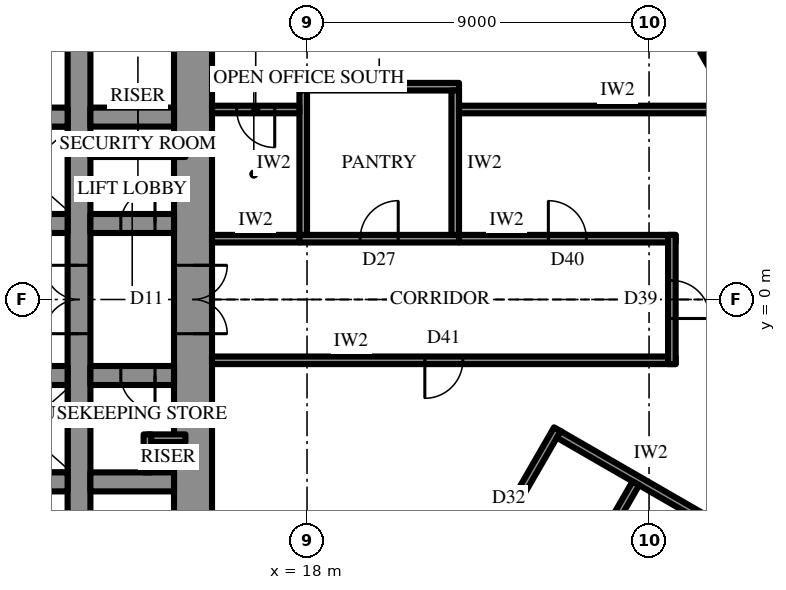
"""IFC4 building model, lengths in metres.
Left out: names, types, materials, properties, quantities, classifications, styles, units other than length and angle.
Written with IfcOpenShell. Run it as: python <this file> out.ifc"""

import sys

from ifc_helpers import new_model, si_unit, direction, frame, frame_2d, origin, origin_2d, place, context, subcontext, project, spatial, rectangle, extrude, element, fill, save


model = new_model("IFC4")
c1 = context("Model", 3, precision=1e-05, world=origin(), true_north=direction((0.0, 1.0)))
c2 = subcontext(c1, "Body", "Model", "MODEL_VIEW")
j1 = project(units=[si_unit("LENGTHUNIT", "METRE"), si_unit("PLANEANGLEUNIT", "RADIAN")], contexts=[c1])
p1 = place(None, origin())
s1 = spatial("IfcSite", under=j1, at=p1, CompositionType="ELEMENT")
p2 = place(p1, origin())
s2 = spatial("IfcBuilding", under=s1, at=p2, CompositionType="ELEMENT")
p3 = place(p2, frame((0.0, 0.0, 244.9)))
s3 = spatial("IfcBuildingStorey", under=s2, at=p3, CompositionType="ELEMENT", Elevation=244.9)
for number, where, z_axis, x_axis in (
    (1, (29.171, 6.175, 0.0), (0.0, 0.0, 1.0), (-0.5, 0.866, 0.0)),
    (2, (29.171, -6.175, 0.0), (0.0, 0.0, 1.0), (0.5, 0.866, 0.0)),
):
    element("IfcColumn", number, at=place(p3, frame(where, z_axis=z_axis, x_axis=x_axis)), inside=s3, PredefinedType="COLUMN", context=c2, shape_type="SweptSolid", body=[
        extrude(rectangle(XDim=1.3, YDim=1.1, at=origin_2d()), origin(), (0.0, 0.0, 1.0), 4.2),
    ])
p4 = place(p3, frame((15.0, -10.7, 0.0), z_axis=(0.0, 0.0, 1.0), x_axis=(0.0, 1.0, 0.0)))
e3 = element("IfcWall", 3, at=p4, inside=s3, PredefinedType="SHEAR", context=c2, shape_type="SweptSolid", body=[
    extrude(rectangle(XDim=21.4, YDim=1.0, at=frame_2d((10.7, 0.0))), origin(), (0.0, 0.0, 1.0), 4.2),
])
p5 = place(p4, frame((9.8, 0.0, 0.0)))
e4 = element("IfcOpeningElement", 4, at=p5, cuts=e3, PredefinedType="OPENING", context=c2, shape_type="SweptSolid", body=[
    extrude(rectangle(XDim=1.8, YDim=2.4, at=frame_2d((0.9, 1.2))), frame((0.0, 0.51, 0.0), z_axis=(0.0, -1.0, 0.0), x_axis=(1.0, 0.0, 0.0)), (0.0, 0.0, 1.0), 1.02),
])
p6 = place(p3, frame((12.0, -10.7, 0.0), z_axis=(0.0, 0.0, 1.0), x_axis=(0.0, 1.0, 0.0)))
e5 = element("IfcWall", 5, at=p6, inside=s3, PredefinedType="SHEAR", context=c2, shape_type="SweptSolid", body=[
    extrude(rectangle(XDim=21.4, YDim=0.6, at=frame_2d((10.7, 0.0))), origin(), (0.0, 0.0, 1.0), 4.2),
])
p7 = place(p6, frame((9.8, 0.0, 0.0)))
e6 = element("IfcOpeningElement", 6, at=p7, cuts=e5, PredefinedType="OPENING", context=c2, shape_type="SweptSolid", body=[
    extrude(rectangle(XDim=1.8, YDim=2.4, at=frame_2d((0.9, 1.2))), frame((0.0, 0.31, 0.0), z_axis=(0.0, -1.0, 0.0), x_axis=(1.0, 0.0, 0.0)), (0.0, 0.0, 1.0), 0.62),
])
p8 = place(p3, frame((-3.2, 2.0, 0.0), z_axis=(0.0, 0.0, 1.0), x_axis=(1.0, 0.0, 0.0)))
e7 = element("IfcWall", 7, at=p8, inside=s3, PredefinedType="SHEAR", context=c2, shape_type="SweptSolid", body=[
    extrude(rectangle(XDim=14.9, YDim=0.5, at=frame_2d((7.45, 0.0))), origin(), (0.0, 0.0, 1.0), 4.2),
])
p9 = place(p8, frame((1.15, 0.0, 0.0)))
e8 = element("IfcOpeningElement", 8, at=p9, cuts=e7, PredefinedType="OPENING", context=c2, shape_type="SweptSolid", body=[
    extrude(rectangle(XDim=1.1, YDim=2.2, at=frame_2d((0.55, 1.1))), frame((0.0, 0.26, 0.0), z_axis=(0.0, -1.0, 0.0), x_axis=(1.0, 0.0, 0.0)), (0.0, 0.0, 1.0), 0.52),
])
p10 = place(p8, frame((4.15, 0.0, 0.0)))
e9 = element("IfcOpeningElement", 9, at=p10, cuts=e7, PredefinedType="OPENING", context=c2, shape_type="SweptSolid", body=[
    extrude(rectangle(XDim=1.1, YDim=2.2, at=frame_2d((0.55, 1.1))), frame((0.0, 0.26, 0.0), z_axis=(0.0, -1.0, 0.0), x_axis=(1.0, 0.0, 0.0)), (0.0, 0.0, 1.0), 0.52),
])
p11 = place(p8, frame((7.15, 0.0, 0.0)))
e10 = element("IfcOpeningElement", 10, at=p11, cuts=e7, PredefinedType="OPENING", context=c2, shape_type="SweptSolid", body=[
    extrude(rectangle(XDim=1.1, YDim=2.2, at=frame_2d((0.55, 1.1))), frame((0.0, 0.26, 0.0), z_axis=(0.0, -1.0, 0.0), x_axis=(1.0, 0.0, 0.0)), (0.0, 0.0, 1.0), 0.52),
])
p12 = place(p8, frame((10.15, 0.0, 0.0)))
e11 = element("IfcOpeningElement", 11, at=p12, cuts=e7, PredefinedType="OPENING", context=c2, shape_type="SweptSolid", body=[
    extrude(rectangle(XDim=1.1, YDim=2.2, at=frame_2d((0.55, 1.1))), frame((0.0, 0.26, 0.0), z_axis=(0.0, -1.0, 0.0), x_axis=(1.0, 0.0, 0.0)), (0.0, 0.0, 1.0), 0.52),
])
p13 = place(p3, frame((12.3, 2.0, 0.0), z_axis=(0.0, 0.0, 1.0), x_axis=(1.0, 0.0, 0.0)))
e12 = element("IfcWall", 12, at=p13, inside=s3, PredefinedType="SHEAR", context=c2, shape_type="SweptSolid", body=[
    extrude(rectangle(XDim=2.2, YDim=0.5, at=frame_2d((1.1, 0.0))), origin(), (0.0, 0.0, 1.0), 4.2),
])
p14 = place(p13, frame((0.8, 0.0, 0.0)))
e13 = element("IfcOpeningElement", 13, at=p14, cuts=e12, PredefinedType="OPENING", context=c2, shape_type="SweptSolid", body=[
    extrude(rectangle(XDim=0.9, YDim=2.2, at=frame_2d((0.45, 1.1))), frame((0.0, 0.26, 0.0), z_axis=(0.0, -1.0, 0.0), x_axis=(1.0, 0.0, 0.0)), (0.0, 0.0, 1.0), 0.52),
])
p15 = place(p3, frame((-11.7, 4.8, 0.0), z_axis=(0.0, 0.0, 1.0), x_axis=(1.0, 0.0, 0.0)))
e14 = element("IfcWall", 14, at=p15, inside=s3, PredefinedType="SHEAR", context=c2, shape_type="SweptSolid", body=[
    extrude(rectangle(XDim=23.4, YDim=0.5, at=frame_2d((11.7, 0.0))), origin(), (0.0, 0.0, 1.0), 4.2),
])
p16 = place(p15, frame((6.6, 0.0, 0.0)))
e15 = element("IfcOpeningElement", 15, at=p16, cuts=e14, PredefinedType="OPENING", context=c2, shape_type="SweptSolid", body=[
    extrude(rectangle(XDim=1.2, YDim=2.2, at=frame_2d((0.6, 1.1))), frame((0.0, 0.26, 0.0), z_axis=(0.0, -1.0, 0.0), x_axis=(1.0, 0.0, 0.0)), (0.0, 0.0, 1.0), 0.52),
])
p17 = place(p15, frame((3.6, 0.0, 0.0)))
e16 = element("IfcOpeningElement", 16, at=p17, cuts=e14, PredefinedType="OPENING", context=c2, shape_type="SweptSolid", body=[
    extrude(rectangle(XDim=1.2, YDim=2.2, at=frame_2d((0.6, 1.1))), frame((0.0, 0.26, 0.0), z_axis=(0.0, -1.0, 0.0), x_axis=(1.0, 0.0, 0.0)), (0.0, 0.0, 1.0), 0.52),
])
p18 = place(p3, frame((12.3, 4.8, 0.0), z_axis=(0.0, 0.0, 1.0), x_axis=(1.0, 0.0, 0.0)))
e17 = element("IfcWall", 17, at=p18, inside=s3, PredefinedType="SHEAR", context=c2, shape_type="SweptSolid", body=[
    extrude(rectangle(XDim=2.2, YDim=0.5, at=frame_2d((1.1, 0.0))), origin(), (0.0, 0.0, 1.0), 4.2),
])
p19 = place(p3, frame((14.5, -2.0, 0.0), z_axis=(0.0, 0.0, 1.0), x_axis=(-1.0, 0.0, 0.0)))
e18 = element("IfcWall", 18, at=p19, inside=s3, PredefinedType="SHEAR", context=c2, shape_type="SweptSolid", body=[
    extrude(rectangle(XDim=2.2, YDim=0.5, at=frame_2d((1.1, 0.0))), origin(), (0.0, 0.0, 1.0), 4.2),
])
p20 = place(p19, frame((0.5, 0.0, 0.0)))
e19 = element("IfcOpeningElement", 19, at=p20, cuts=e18, PredefinedType="OPENING", context=c2, shape_type="SweptSolid", body=[
    extrude(rectangle(XDim=0.9, YDim=2.2, at=frame_2d((0.45, 1.1))), frame((0.0, 0.26, 0.0), z_axis=(0.0, -1.0, 0.0), x_axis=(1.0, 0.0, 0.0)), (0.0, 0.0, 1.0), 0.52),
])
p21 = place(p3, frame((11.7, -2.0, 0.0), z_axis=(0.0, 0.0, 1.0), x_axis=(-1.0, 0.0, 0.0)))
e20 = element("IfcWall", 20, at=p21, inside=s3, PredefinedType="SHEAR", context=c2, shape_type="SweptSolid", body=[
    extrude(rectangle(XDim=5.9, YDim=0.5, at=frame_2d((2.95, 0.0))), origin(), (0.0, 0.0, 1.0), 4.2),
])
p22 = place(p3, frame((14.5, -4.8, 0.0), z_axis=(0.0, 0.0, 1.0), x_axis=(-1.0, 0.0, 0.0)))
e21 = element("IfcWall", 21, at=p22, inside=s3, PredefinedType="SHEAR", context=c2, shape_type="SweptSolid", body=[
    extrude(rectangle(XDim=2.2, YDim=0.5, at=frame_2d((1.1, 0.0))), origin(), (0.0, 0.0, 1.0), 4.2),
])
p23 = place(p3, frame((11.7, -4.8, 0.0), z_axis=(0.0, 0.0, 1.0), x_axis=(-1.0, 0.0, 0.0)))
e22 = element("IfcWall", 22, at=p23, inside=s3, PredefinedType="SHEAR", context=c2, shape_type="SweptSolid", body=[
    extrude(rectangle(XDim=23.4, YDim=0.5, at=frame_2d((11.7, 0.0))), origin(), (0.0, 0.0, 1.0), 4.2),
])
p24 = place(p23, frame((6.6, 0.0, 0.0)))
e23 = element("IfcOpeningElement", 23, at=p24, cuts=e22, PredefinedType="OPENING", context=c2, shape_type="SweptSolid", body=[
    extrude(rectangle(XDim=1.2, YDim=2.2, at=frame_2d((0.6, 1.1))), frame((0.0, 0.26, 0.0), z_axis=(0.0, -1.0, 0.0), x_axis=(1.0, 0.0, 0.0)), (0.0, 0.0, 1.0), 0.52),
])
p25 = place(p23, frame((3.6, 0.0, 0.0)))
e24 = element("IfcOpeningElement", 24, at=p25, cuts=e22, PredefinedType="OPENING", context=c2, shape_type="SweptSolid", body=[
    extrude(rectangle(XDim=1.2, YDim=2.2, at=frame_2d((0.6, 1.1))), frame((0.0, 0.26, 0.0), z_axis=(0.0, -1.0, 0.0), x_axis=(1.0, 0.0, 0.0)), (0.0, 0.0, 1.0), 0.52),
])
p26 = place(p3, frame((18.707, -25.299, 0.0), z_axis=(0.0, 0.0, 1.0), x_axis=(0.500000442367, 0.866025148383, 0.0)))
e25 = element("IfcWall", 25, at=p26, inside=s3, PredefinedType="SOLIDWALL", context=c2, shape_type="SweptSolid", body=[
    extrude(rectangle(XDim=25.113, YDim=0.3, at=frame_2d((12.556, 0.0))), origin(), (0.0, 0.0, 1.0), 2.8),
])
p27 = place(p26, frame((4.278, 0.0, 0.6)))
e26 = element("IfcOpeningElement", 26, at=p27, cuts=e25, PredefinedType="OPENING", context=c2, shape_type="SweptSolid", body=[
    extrude(rectangle(XDim=2.7, YDim=1.95, at=frame_2d((1.35, 0.975))), frame((0.0, 0.16, 0.0), z_axis=(0.0, -1.0, 0.0), x_axis=(1.0, 0.0, 0.0)), (0.0, 0.0, 1.0), 0.32),
])
p28 = place(p26, frame((9.647, 0.0, 0.0)))
e27 = element("IfcOpeningElement", 27, at=p28, cuts=e25, PredefinedType="OPENING", context=c2, shape_type="SweptSolid", body=[
    extrude(rectangle(XDim=1.2, YDim=2.4, at=frame_2d((0.6, 1.2))), frame((0.0, 0.16, 0.0), z_axis=(0.0, -1.0, 0.0), x_axis=(1.0, 0.0, 0.0)), (0.0, 0.0, 1.0), 0.32),
])
p29 = place(p26, frame((13.516, 0.0, 0.6)))
e28 = element("IfcOpeningElement", 28, at=p29, cuts=e25, PredefinedType="OPENING", context=c2, shape_type="SweptSolid", body=[
    extrude(rectangle(XDim=2.7, YDim=1.95, at=frame_2d((1.35, 0.975))), frame((0.0, 0.16, 0.0), z_axis=(0.0, -1.0, 0.0), x_axis=(1.0, 0.0, 0.0)), (0.0, 0.0, 1.0), 0.32),
])
p30 = place(p26, frame((18.135, 0.0, 0.6)))
e29 = element("IfcOpeningElement", 29, at=p30, cuts=e25, PredefinedType="OPENING", context=c2, shape_type="SweptSolid", body=[
    extrude(rectangle(XDim=2.7, YDim=1.95, at=frame_2d((1.35, 0.975))), frame((0.0, 0.16, 0.0), z_axis=(0.0, -1.0, 0.0), x_axis=(1.0, 0.0, 0.0)), (0.0, 0.0, 1.0), 0.32),
])
p31 = place(p3, frame((12.3, 3.85, 0.0), z_axis=(0.0, 0.0, 1.0), x_axis=(1.0, 0.0, 0.0)))
e30 = element("IfcWall", 30, at=p31, inside=s3, PredefinedType="PARTITIONING", context=c2, shape_type="SweptSolid", body=[
    extrude(rectangle(XDim=2.5, YDim=0.2, at=frame_2d((1.25, 0.0))), origin(), (0.0, 0.0, 1.0), 4.0),
])
for number, where, z_axis, x_axis in (
    (31, (14.8, -3.65, 0.0), (0.0, 0.0, 1.0), (-1.0, 0.0, 0.0)),
    (32, (13.8, -3.55, 0.0), (0.0, 0.0, 1.0), (0.0, -1.0, 0.0)),
):
    element("IfcWall", number, at=place(p3, frame(where, z_axis=z_axis, x_axis=x_axis)), inside=s3, PredefinedType="PARTITIONING", context=c2, shape_type="SweptSolid", body=[
        extrude(rectangle(XDim=1.0, YDim=0.2, at=frame_2d((0.5, 0.0))), origin(), (0.0, 0.0, 1.0), 4.0),
    ])
p32 = place(p3, frame((17.559, -15.587, 0.0), z_axis=(0.0, 0.0, 1.0), x_axis=(0.500002095642, 0.866024193862, 0.0)))
e33 = element("IfcWall", 33, at=p32, inside=s3, PredefinedType="PARTITIONING", context=c2, shape_type="SweptSolid", body=[
    extrude(rectangle(XDim=14.057, YDim=0.2, at=frame_2d((7.028, 0.0))), origin(), (0.0, 0.0, 1.0), 4.0),
])
p33 = place(p32, frame((6.528, 0.0, 0.0)))
e34 = element("IfcOpeningElement", 34, at=p33, cuts=e33, PredefinedType="OPENING", context=c2, shape_type="SweptSolid", body=[
    extrude(rectangle(XDim=1.0, YDim=2.2, at=frame_2d((0.5, 1.1))), frame((0.0, 0.11, 0.0), z_axis=(0.0, -1.0, 0.0), x_axis=(1.0, 0.0, 0.0)), (0.0, 0.0, 1.0), 0.22),
])
p34 = place(p3, frame((24.624, -3.55, 0.0), z_axis=(0.0, 0.0, 1.0), x_axis=(0.866038532462, -0.499977259774, 0.0)))
e35 = element("IfcWall", 35, at=p34, inside=s3, PredefinedType="PARTITIONING", context=c2, shape_type="SweptSolid", body=[
    extrude(rectangle(XDim=4.7, YDim=0.2, at=frame_2d((2.35, 0.0))), origin(), (0.0, 0.0, 1.0), 3.082),
])
p35 = place(p3, frame((24.443, -8.663, 0.0), z_axis=(0.0, 0.0, 1.0), x_axis=(0.499983916363, 0.866034689477, 0.0)))
e36 = element("IfcWall", 36, at=p35, inside=s3, PredefinedType="PARTITIONING", context=c2, shape_type="SweptSolid", body=[
    extrude(rectangle(XDim=4.419, YDim=0.2, at=frame_2d((2.209, 0.0))), origin(), (0.0, 0.0, 1.0), 4.0),
])
p36 = place(p3, frame((17.8, 1.6, 0.0), z_axis=(0.0, 0.0, 1.0), x_axis=(1.0, 0.0, 0.0)))
e37 = element("IfcWall", 37, at=p36, inside=s3, PredefinedType="PARTITIONING", context=c2, shape_type="SweptSolid", body=[
    extrude(rectangle(XDim=4.2, YDim=0.2, at=frame_2d((2.1, 0.0))), origin(), (0.0, 0.0, 1.0), 4.0),
])
p37 = place(p36, frame((1.6, 0.0, 0.0)))
e38 = element("IfcOpeningElement", 38, at=p37, cuts=e37, PredefinedType="OPENING", context=c2, shape_type="SweptSolid", body=[
    extrude(rectangle(XDim=1.0, YDim=2.2, at=frame_2d((0.5, 1.1))), frame((0.0, 0.11, 0.0), z_axis=(0.0, -1.0, 0.0), x_axis=(1.0, 0.0, 0.0)), (0.0, 0.0, 1.0), 0.22),
])
p38 = place(p3, frame((17.8, 5.6, 0.0), z_axis=(0.0, 0.0, 1.0), x_axis=(1.0, 0.0, 0.0)))
e39 = element("IfcWall", 39, at=p38, inside=s3, PredefinedType="PARTITIONING", context=c2, shape_type="SweptSolid", body=[
    extrude(rectangle(XDim=4.2, YDim=0.2, at=frame_2d((2.1, 0.0))), origin(), (0.0, 0.0, 1.0), 4.0),
])
for number, where, z_axis, x_axis in (
    (40, (17.9, 1.7, 0.0), (0.0, 0.0, 1.0), (0.0, 1.0, 0.0)),
    (41, (21.9, 1.7, 0.0), (0.0, 0.0, 1.0), (0.0, 1.0, 0.0)),
):
    element("IfcWall", number, at=place(p3, frame(where, z_axis=z_axis, x_axis=x_axis)), inside=s3, PredefinedType="PARTITIONING", context=c2, shape_type="SweptSolid", body=[
        extrude(rectangle(XDim=3.8, YDim=0.2, at=frame_2d((1.9, 0.0))), origin(), (0.0, 0.0, 1.0), 4.0),
    ])
p39 = place(p3, frame((15.5, 1.6, 0.0), z_axis=(0.0, 0.0, 1.0), x_axis=(1.0, 0.0, 0.0)))
e42 = element("IfcWall", 42, at=p39, inside=s3, PredefinedType="PARTITIONING", context=c2, shape_type="SweptSolid", body=[
    extrude(rectangle(XDim=2.3, YDim=0.2, at=frame_2d((1.15, 0.0))), origin(), (0.0, 0.0, 1.0), 4.0),
])
p40 = place(p3, frame((22.0, 1.6, 0.0), z_axis=(0.0, 0.0, 1.0), x_axis=(1.0, 0.0, 0.0)))
e43 = element("IfcWall", 43, at=p40, inside=s3, PredefinedType="PARTITIONING", context=c2, shape_type="SweptSolid", body=[
    extrude(rectangle(XDim=5.7, YDim=0.2, at=frame_2d((2.85, 0.0))), origin(), (0.0, 0.0, 1.0), 4.0),
])
p41 = place(p40, frame((2.35, 0.0, 0.0)))
e44 = element("IfcOpeningElement", 44, at=p41, cuts=e43, PredefinedType="OPENING", context=c2, shape_type="SweptSolid", body=[
    extrude(rectangle(XDim=1.0, YDim=2.2, at=frame_2d((0.5, 1.1))), frame((0.0, 0.11, 0.0), z_axis=(0.0, -1.0, 0.0), x_axis=(1.0, 0.0, 0.0)), (0.0, 0.0, 1.0), 0.22),
])
p42 = place(p3, frame((15.5, -1.6, 0.0), z_axis=(0.0, 0.0, 1.0), x_axis=(1.0, 0.0, 0.0)))
e45 = element("IfcWall", 45, at=p42, inside=s3, PredefinedType="PARTITIONING", context=c2, shape_type="SweptSolid", body=[
    extrude(rectangle(XDim=12.2, YDim=0.2, at=frame_2d((6.1, 0.0))), origin(), (0.0, 0.0, 1.0), 4.0),
])
p43 = place(p42, frame((5.6, 0.0, 0.0)))
e46 = element("IfcOpeningElement", 46, at=p43, cuts=e45, PredefinedType="OPENING", context=c2, shape_type="SweptSolid", body=[
    extrude(rectangle(XDim=1.0, YDim=2.2, at=frame_2d((0.5, 1.1))), frame((0.0, 0.11, 0.0), z_axis=(0.0, -1.0, 0.0), x_axis=(1.0, 0.0, 0.0)), (0.0, 0.0, 1.0), 0.22),
])
p44 = place(p3, frame((27.6, -1.7, 0.0), z_axis=(0.0, 0.0, 1.0), x_axis=(0.0, 1.0, 0.0)))
e47 = element("IfcWall", 47, at=p44, inside=s3, PredefinedType="PARTITIONING", context=c2, shape_type="SweptSolid", body=[
    extrude(rectangle(XDim=3.4, YDim=0.2, at=frame_2d((1.7, 0.0))), origin(), (0.0, 0.0, 1.0), 4.0),
])
p45 = place(p44, frame((1.2, 0.0, 0.0)))
e48 = element("IfcOpeningElement", 48, at=p45, cuts=e47, PredefinedType="OPENING", context=c2, shape_type="SweptSolid", body=[
    extrude(rectangle(XDim=1.0, YDim=2.2, at=frame_2d((0.5, 1.1))), frame((0.0, 0.11, 0.0), z_axis=(0.0, -1.0, 0.0), x_axis=(1.0, 0.0, 0.0)), (0.0, 0.0, 1.0), 0.22),
])
p46 = place(p3, frame((15.5, 5.0, 0.0), z_axis=(0.0, 0.0, 1.0), x_axis=(1.0, 0.0, 0.0)))
e49 = element("IfcWall", 49, at=p46, inside=s3, PredefinedType="PARTITIONING", context=c2, shape_type="SweptSolid", body=[
    extrude(rectangle(XDim=2.3, YDim=0.2, at=frame_2d((1.15, 0.0))), origin(), (0.0, 0.0, 1.0), 4.0),
])
p47 = place(p46, frame((0.65, 0.0, 0.0)))
e50 = element("IfcOpeningElement", 50, at=p47, cuts=e49, PredefinedType="OPENING", context=c2, shape_type="SweptSolid", body=[
    extrude(rectangle(XDim=1.0, YDim=2.2, at=frame_2d((0.5, 1.1))), frame((0.0, 0.11, 0.0), z_axis=(0.0, -1.0, 0.0), x_axis=(1.0, 0.0, 0.0)), (0.0, 0.0, 1.0), 0.22),
])
p48 = place(p3, frame((22.0, 5.0, 0.0), z_axis=(0.0, 0.0, 1.0), x_axis=(1.0, 0.0, 0.0)))
e51 = element("IfcWall", 51, at=p48, inside=s3, PredefinedType="PARTITIONING", context=c2, shape_type="SweptSolid", body=[
    extrude(rectangle(XDim=8.345, YDim=0.2, at=frame_2d((4.173, 0.0))), origin(), (0.0, 0.0, 1.0), 4.0),
])
p49 = place(p5, frame((1.8, 0.0, 0.0), z_axis=(0.0, 0.0, 1.0), x_axis=(-1.0, 0.0, 0.0)))
e52 = element("IfcDoor", 52, at=p49, inside=s3, OperationType="DOUBLE_DOOR_SINGLE_SWING", PredefinedType="DOOR", context=c2, shape_type="SweptSolid", body=[
    extrude(rectangle(XDim=1.8, YDim=2.4, at=frame_2d((0.9, 1.2))), frame((0.0, 0.025, 0.0), z_axis=(0.0, -1.0, 0.0), x_axis=(1.0, 0.0, 0.0)), (0.0, 0.0, 1.0), 0.05),
])
fill(e4, e52)
p50 = place(p14, origin())
e53 = element("IfcDoor", 53, at=p50, inside=s3, OperationType="SINGLE_SWING_LEFT", PredefinedType="DOOR", context=c2, shape_type="SweptSolid", body=[
    extrude(rectangle(XDim=0.9, YDim=2.2, at=frame_2d((0.45, 1.1))), frame((0.0, 0.025, 0.0), z_axis=(0.0, -1.0, 0.0), x_axis=(1.0, 0.0, 0.0)), (0.0, 0.0, 1.0), 0.05),
])
fill(e13, e53)
p51 = place(p20, origin())
e54 = element("IfcDoor", 54, at=p51, inside=s3, OperationType="SINGLE_SWING_RIGHT", PredefinedType="DOOR", context=c2, shape_type="SweptSolid", body=[
    extrude(rectangle(XDim=0.9, YDim=2.2, at=frame_2d((0.45, 1.1))), frame((0.0, 0.025, 0.0), z_axis=(0.0, -1.0, 0.0), x_axis=(1.0, 0.0, 0.0)), (0.0, 0.0, 1.0), 0.05),
])
fill(e19, e54)
p52 = place(p7, origin())
e55 = element("IfcDoor", 55, at=p52, inside=s3, OperationType="DOUBLE_DOOR_SINGLE_SWING", PredefinedType="DOOR", context=c2, shape_type="SweptSolid", body=[
    extrude(rectangle(XDim=1.8, YDim=2.4, at=frame_2d((0.9, 1.2))), frame((0.0, 0.025, 0.0), z_axis=(0.0, -1.0, 0.0), x_axis=(1.0, 0.0, 0.0)), (0.0, 0.0, 1.0), 0.05),
])
fill(e6, e55)
p53 = place(p37, origin())
e56 = element("IfcDoor", 56, at=p53, inside=s3, OperationType="SINGLE_SWING_LEFT", PredefinedType="DOOR", context=c2, shape_type="SweptSolid", body=[
    extrude(rectangle(XDim=1.0, YDim=2.2, at=frame_2d((0.5, 1.1))), frame((0.0, 0.025, 0.0), z_axis=(0.0, -1.0, 0.0), x_axis=(1.0, 0.0, 0.0)), (0.0, 0.0, 1.0), 0.05),
])
fill(e38, e56)
p54 = place(p41, origin())
e57 = element("IfcDoor", 57, at=p54, inside=s3, OperationType="SINGLE_SWING_RIGHT", PredefinedType="DOOR", context=c2, shape_type="SweptSolid", body=[
    extrude(rectangle(XDim=1.0, YDim=2.2, at=frame_2d((0.5, 1.1))), frame((0.0, 0.025, 0.0), z_axis=(0.0, -1.0, 0.0), x_axis=(1.0, 0.0, 0.0)), (0.0, 0.0, 1.0), 0.05),
])
fill(e44, e57)
p55 = place(p43, frame((1.0, 0.0, 0.0), z_axis=(0.0, 0.0, 1.0), x_axis=(-1.0, 0.0, 0.0)))
e58 = element("IfcDoor", 58, at=p55, inside=s3, OperationType="SINGLE_SWING_LEFT", PredefinedType="DOOR", context=c2, shape_type="SweptSolid", body=[
    extrude(rectangle(XDim=1.0, YDim=2.2, at=frame_2d((0.5, 1.1))), frame((0.0, 0.025, 0.0), z_axis=(0.0, -1.0, 0.0), x_axis=(1.0, 0.0, 0.0)), (0.0, 0.0, 1.0), 0.05),
])
fill(e46, e58)
p56 = place(p45, frame((1.0, 0.0, 0.0), z_axis=(0.0, 0.0, 1.0), x_axis=(-1.0, 0.0, 0.0)))
e59 = element("IfcDoor", 59, at=p56, inside=s3, OperationType="SINGLE_SWING_LEFT", PredefinedType="DOOR", context=c2, shape_type="SweptSolid", body=[
    extrude(rectangle(XDim=1.0, YDim=2.2, at=frame_2d((0.5, 1.1))), frame((0.0, 0.025, 0.0), z_axis=(0.0, -1.0, 0.0), x_axis=(1.0, 0.0, 0.0)), (0.0, 0.0, 1.0), 0.05),
])
fill(e48, e59)
p57 = place(p47, frame((1.0, 0.0, 0.0), z_axis=(0.0, 0.0, 1.0), x_axis=(-1.0, 0.0, 0.0)))
e60 = element("IfcDoor", 60, at=p57, inside=s3, OperationType="SINGLE_SWING_RIGHT", PredefinedType="DOOR", context=c2, shape_type="SweptSolid", body=[
    extrude(rectangle(XDim=1.0, YDim=2.2, at=frame_2d((0.5, 1.1))), frame((0.0, 0.025, 0.0), z_axis=(0.0, -1.0, 0.0), x_axis=(1.0, 0.0, 0.0)), (0.0, 0.0, 1.0), 0.05),
])
fill(e50, e60)
save(model, sys.argv[1])
